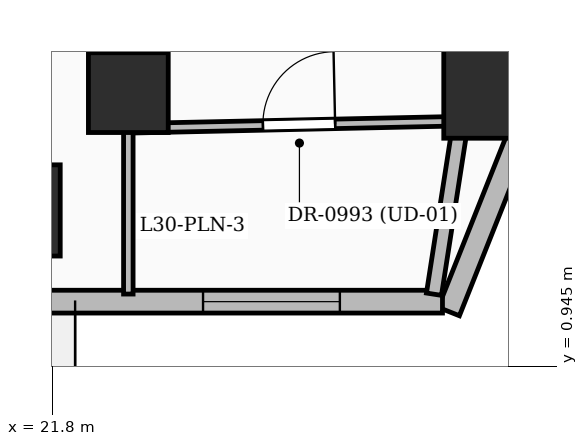
"""IFC4 building model, lengths in metres.
Left out: names, types, materials, properties, quantities, classifications, styles, units other than length and angle.
Written with IfcOpenShell. Run it as: python <this file> out.ifc"""

import sys

from ifc_helpers import new_model, si_unit, direction, frame, frame_2d, origin, origin_2d, place, context, subcontext, project, spatial, rectangle, extrude, element, fill, save


model = new_model("IFC4")
c1 = context("Model", 3, precision=1e-05, world=origin(), true_north=direction((0.0, 1.0)))
c2 = subcontext(c1, "Body", "Model", "MODEL_VIEW")
j1 = project(units=[si_unit("LENGTHUNIT", "METRE"), si_unit("PLANEANGLEUNIT", "RADIAN")], contexts=[c1])
p1 = place(None, origin())
s1 = spatial("IfcSite", under=j1, at=p1, CompositionType="ELEMENT")
p2 = place(p1, origin())
s2 = spatial("IfcBuilding", under=s1, at=p2, CompositionType="ELEMENT")
p3 = place(p2, frame((0.0, 0.0, 121.2)))
s3 = spatial("IfcBuildingStorey", under=s2, at=p3, CompositionType="ELEMENT", Elevation=121.2)
p4 = place(p3, frame((27.55, 4.55, 0.0), z_axis=(0.0, 0.0, 1.0), x_axis=(1.0, 0.0, 0.0)))
e1 = element("IfcColumn", 1, at=p4, inside=s3, PredefinedType="COLUMN", context=c2, shape_type="SweptSolid", body=[
    extrude(rectangle(XDim=1.2, YDim=1.2, at=origin_2d()), origin(), (0.0, 0.0, 1.0), 3.6),
])
p5 = place(p3, frame((22.8, 4.55, 0.0), z_axis=(0.0, 0.0, 1.0), x_axis=(1.0, 0.0, 0.0)))
e2 = element("IfcColumn", 2, at=p5, inside=s3, PredefinedType="COLUMN", context=c2, shape_type="SweptSolid", body=[
    extrude(rectangle(XDim=1.05, YDim=1.05, at=origin_2d()), origin(), (0.0, 0.0, 1.0), 3.6),
])
p6 = place(p3, frame((21.304, 3.0, 0.0), z_axis=(0.0, 0.0, 1.0), x_axis=(1.0, 0.0, 0.0)))
e3 = element("IfcColumn", 3, at=p6, inside=s3, PredefinedType="COLUMN", context=c2, shape_type="SweptSolid", body=[
    extrude(rectangle(XDim=1.2, YDim=1.2, at=origin_2d()), origin(), (0.0, 0.0, 1.0), 3.6),
])
p7 = place(p3, frame((27.975, 4.08, 0.0), z_axis=(0.0, 0.0, 1.0), x_axis=(-0.369458593648, -0.929247194012, 0.0)))
e4 = element("IfcWall", 4, at=p7, inside=s3, PredefinedType="SOLIDWALL", context=c2, shape_type="SweptSolid", body=[
    extrude(rectangle(XDim=2.594, YDim=0.3, at=frame_2d((1.297, 0.0))), origin(), (0.0, 0.0, 1.0), 2.575),
])
p8 = place(p3, frame((26.933, 1.8, 0.0), z_axis=(0.0, 0.0, 1.0), x_axis=(-1.0, 0.0, 0.0)))
e5 = element("IfcWall", 5, at=p8, inside=s3, PredefinedType="SOLIDWALL", context=c2, shape_type="SweptSolid", body=[
    extrude(rectangle(XDim=6.599, YDim=0.3, at=frame_2d((3.3, 0.0))), origin(), (0.0, 0.0, 1.0), 3.35),
])
p9 = place(p8, frame((1.35, 0.0, 0.6)))
e6 = element("IfcOpeningElement", 6, at=p9, cuts=e5, PredefinedType="OPENING", context=c2, shape_type="SweptSolid", body=[
    extrude(rectangle(XDim=1.8, YDim=2.1, at=frame_2d((0.9, 1.05))), frame((0.0, 0.16, 0.0), z_axis=(0.0, -1.0, 0.0), x_axis=(1.0, 0.0, 0.0)), (0.0, 0.0, 1.0), 0.32),
])
p10 = place(p3, frame((22.8, 4.08, 0.0), z_axis=(0.0, 0.0, 1.0), x_axis=(0.999764473519, 0.021702476574, 0.0)))
e7 = element("IfcWall", 7, at=p10, inside=s3, PredefinedType="PARTITIONING", context=c2, shape_type="SweptSolid", body=[
    extrude(rectangle(XDim=4.376, YDim=0.125, at=frame_2d((2.188, 0.0))), origin(), (0.0, 0.0, 1.0), 3.35),
])
p11 = place(p10, frame((1.771, 0.0, 0.0)))
e8 = element("IfcOpeningElement", 8, at=p11, cuts=e7, PredefinedType="OPENING", context=c2, shape_type="SweptSolid", body=[
    extrude(rectangle(XDim=0.95, YDim=2.2, at=frame_2d((0.475, 1.1))), frame((0.0, 0.072, 0.0), z_axis=(0.0, -1.0, 0.0), x_axis=(1.0, 0.0, 0.0)), (0.0, 0.0, 1.0), 0.145),
])
p12 = place(p3, frame((22.8, 4.15, 0.0), z_axis=(0.0, 0.0, 1.0), x_axis=(0.0, -1.0, 0.0)))
e9 = element("IfcWall", 9, at=p12, inside=s3, PredefinedType="PARTITIONING", context=c2, shape_type="SweptSolid", body=[
    extrude(rectangle(XDim=2.25, YDim=0.125, at=frame_2d((1.125, 0.0))), origin(), (0.0, 0.0, 1.0), 2.57),
])
p13 = place(p3, frame((26.821, 1.898, 0.0), z_axis=(0.0, 0.0, 1.0), x_axis=(0.153495770489, 0.988149304732, 0.0)))
e10 = element("IfcWall", 10, at=p13, inside=s3, PredefinedType="PARTITIONING", context=c2, shape_type="SweptSolid", body=[
    extrude(rectangle(XDim=2.257, YDim=0.2, at=frame_2d((1.128, 0.0))), origin(), (0.0, 0.0, 1.0), 2.57),
])
p14 = place(p9, origin())
e11 = element("IfcWindow", 11, at=p14, inside=s3, PartitioningType="SINGLE_PANEL", PredefinedType="WINDOW", context=c2, shape_type="SweptSolid", body=[
    extrude(rectangle(XDim=1.8, YDim=2.1, at=frame_2d((0.9, 1.05))), frame((0.0, 0.03, 0.0), z_axis=(0.0, -1.0, 0.0), x_axis=(1.0, 0.0, 0.0)), (0.0, 0.0, 1.0), 0.06),
])
fill(e6, e11)
p15 = place(p11, origin())
e12 = element("IfcDoor", 12, at=p15, inside=s3, OperationType="SINGLE_SWING_RIGHT", PredefinedType="DOOR", context=c2, shape_type="SweptSolid", body=[
    extrude(rectangle(XDim=0.95, YDim=2.2, at=frame_2d((0.475, 1.1))), frame((0.0, 0.025, 0.0), z_axis=(0.0, -1.0, 0.0), x_axis=(1.0, 0.0, 0.0)), (0.0, 0.0, 1.0), 0.05),
])
fill(e8, e12)
save(model, sys.argv[1])
